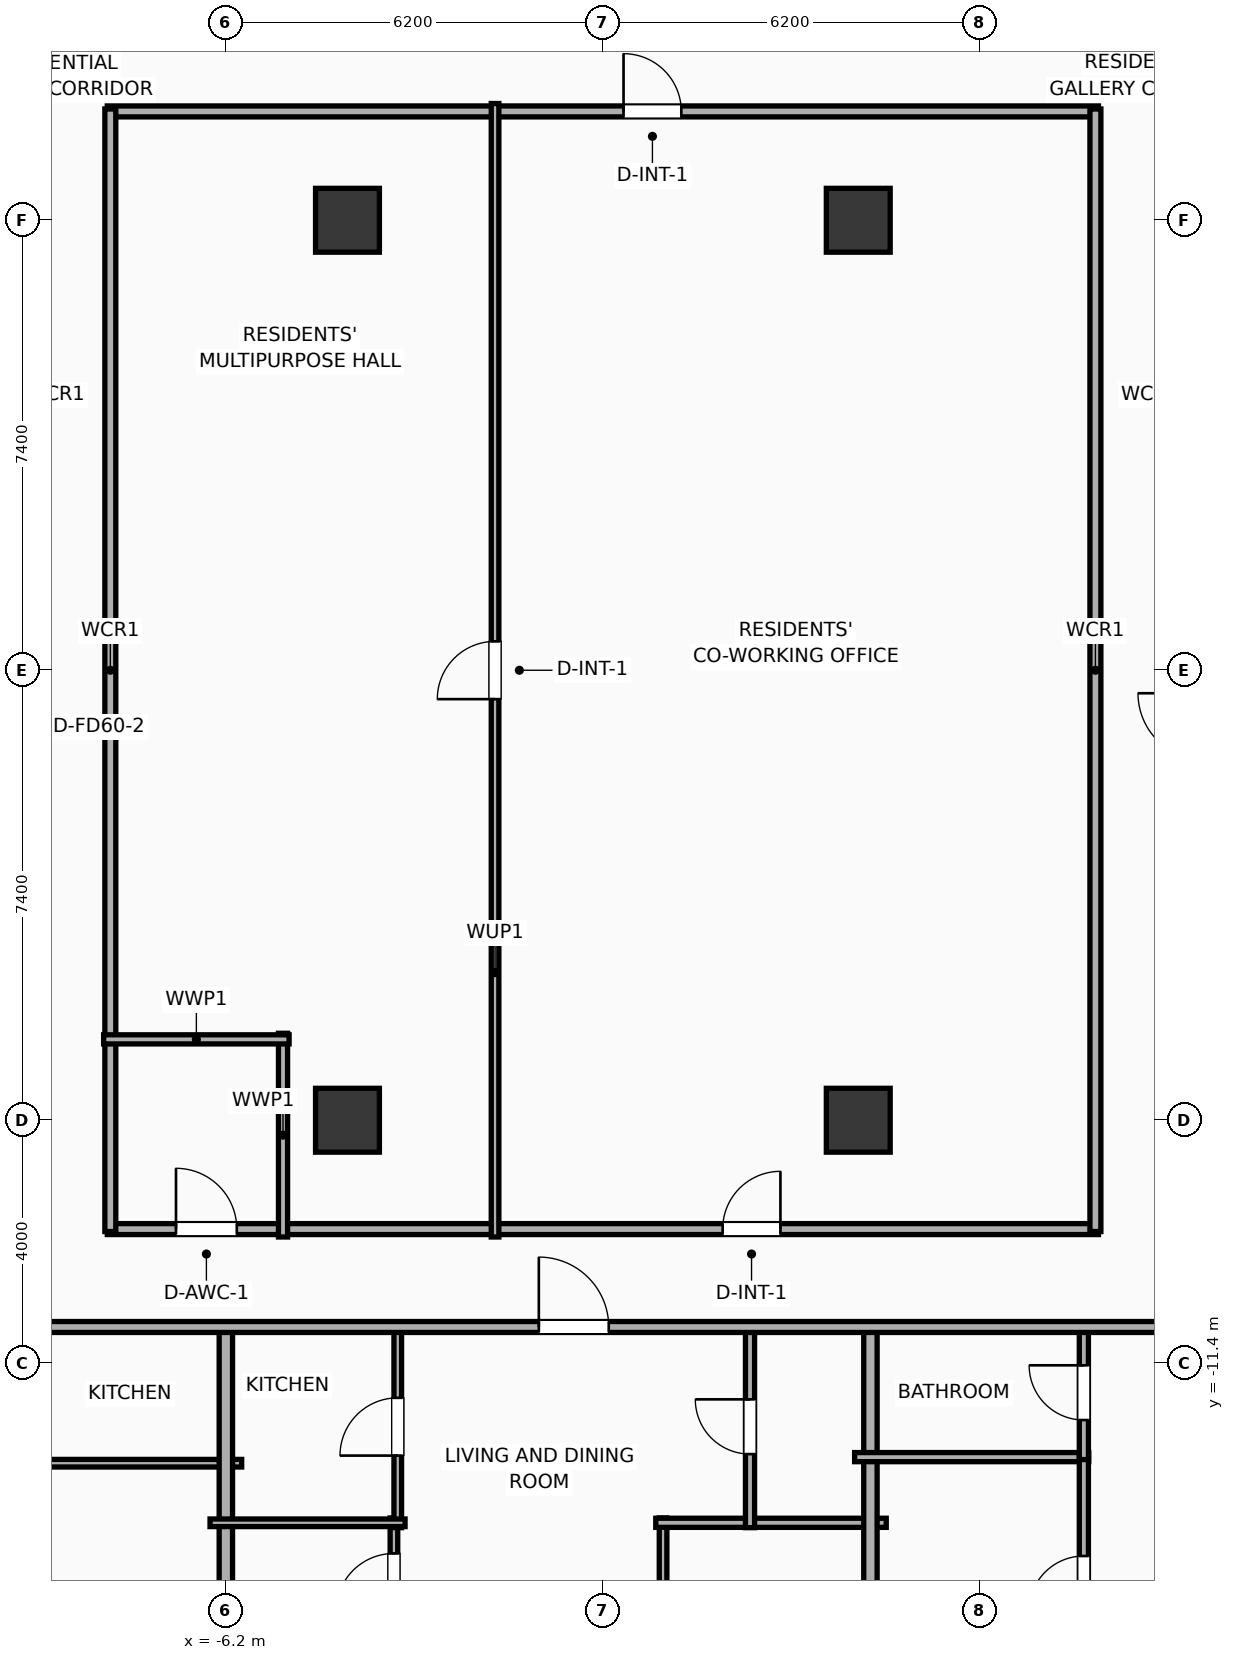
"""IFC4 building model, lengths in metres.
Left out: names, types, materials, properties, quantities, classifications, styles, units other than length and angle.
Written with IfcOpenShell. Run it as: python <this file> out.ifc"""

import sys

from ifc_helpers import new_model, si_unit, direction, frame, frame_2d, origin, origin_2d, place, context, subcontext, project, spatial, rectangle, extrude, element, fill, save


model = new_model("IFC4")
c1 = context("Model", 3, precision=1e-05, world=origin(), true_north=direction((0.0, 1.0)))
c2 = subcontext(c1, "Body", "Model", "MODEL_VIEW")
j1 = project(units=[si_unit("LENGTHUNIT", "METRE"), si_unit("PLANEANGLEUNIT", "RADIAN")], contexts=[c1])
p1 = place(None, origin())
s1 = spatial("IfcSite", under=j1, at=p1, CompositionType="ELEMENT")
p2 = place(p1, origin())
s2 = spatial("IfcBuilding", under=s1, at=p2, CompositionType="ELEMENT")
p3 = place(p2, frame((0.0, 0.0, 132.6)))
s3 = spatial("IfcBuildingStorey", under=s2, at=p3, CompositionType="ELEMENT", Elevation=132.6)
for number, where, z_axis, x_axis in (
    (1, (-4.2, -7.4, 0.0), (0.0, 0.0, 1.0), (1.0, 0.0, 0.0)),
    (2, (-4.2, 7.4, 0.0), (0.0, 0.0, 1.0), (1.0, 0.0, 0.0)),
    (3, (4.2, -7.4, 0.0), (0.0, 0.0, 1.0), (1.0, 0.0, 0.0)),
    (4, (4.2, 7.4, 0.0), (0.0, 0.0, 1.0), (1.0, 0.0, 0.0)),
):
    element("IfcColumn", number, at=place(p3, frame(where, z_axis=z_axis, x_axis=x_axis)), inside=s3, PredefinedType="COLUMN", context=c2, shape_type="SweptSolid", body=[
        extrude(rectangle(XDim=1.05, YDim=1.05, at=origin_2d()), origin(), (0.0, 0.0, 1.0), 3.9),
    ])
p4 = place(p3, frame((-8.15, 9.19, 0.0), z_axis=(0.0, 0.0, 1.0), x_axis=(1.0, 0.0, 0.0)))
e5 = element("IfcWall", 5, at=p4, inside=s3, PredefinedType="PARTITIONING", context=c2, shape_type="SweptSolid", body=[
    extrude(rectangle(XDim=16.3, YDim=0.18, at=frame_2d((8.15, 0.0))), origin(), (0.0, 0.0, 1.0), 3.65),
])
p5 = place(p4, frame((8.49, 0.0, 0.0)))
e6 = element("IfcOpeningElement", 6, at=p5, cuts=e5, PredefinedType="OPENING", context=c2, shape_type="SweptSolid", body=[
    extrude(rectangle(XDim=0.95, YDim=2.05, at=frame_2d((0.475, 1.025))), frame((0.0, 0.1, 0.0), z_axis=(0.0, -1.0, 0.0), x_axis=(1.0, 0.0, 0.0)), (0.0, 0.0, 1.0), 0.2),
])
p6 = place(p3, frame((-8.15, -9.19, 0.0), z_axis=(0.0, 0.0, 1.0), x_axis=(1.0, 0.0, 0.0)))
e7 = element("IfcWall", 7, at=p6, inside=s3, PredefinedType="PARTITIONING", context=c2, shape_type="SweptSolid", body=[
    extrude(rectangle(XDim=16.3, YDim=0.18, at=frame_2d((8.15, 0.0))), origin(), (0.0, 0.0, 1.0), 3.65),
])
p7 = place(p6, frame((1.13, 0.0, 0.0)))
e8 = element("IfcOpeningElement", 8, at=p7, cuts=e7, PredefinedType="OPENING", context=c2, shape_type="SweptSolid", body=[
    extrude(rectangle(XDim=1.0, YDim=2.05, at=frame_2d((0.5, 1.025))), frame((0.0, 0.1, 0.0), z_axis=(0.0, -1.0, 0.0), x_axis=(1.0, 0.0, 0.0)), (0.0, 0.0, 1.0), 0.2),
])
p8 = place(p6, frame((10.12, 0.0, 0.0)))
e9 = element("IfcOpeningElement", 9, at=p8, cuts=e7, PredefinedType="OPENING", context=c2, shape_type="SweptSolid", body=[
    extrude(rectangle(XDim=0.95, YDim=2.05, at=frame_2d((0.475, 1.025))), frame((0.0, 0.1, 0.0), z_axis=(0.0, -1.0, 0.0), x_axis=(1.0, 0.0, 0.0)), (0.0, 0.0, 1.0), 0.2),
])
for number, where, z_axis, x_axis in (
    (10, (-8.1, -9.23, 0.0), (0.0, 0.0, 1.0), (0.0, 1.0, 0.0)),
    (11, (8.1, -9.23, 0.0), (0.0, 0.0, 1.0), (0.0, 1.0, 0.0)),
):
    element("IfcWall", number, at=place(p3, frame(where, z_axis=z_axis, x_axis=x_axis)), inside=s3, PredefinedType="PARTITIONING", context=c2, shape_type="SweptSolid", body=[
        extrude(rectangle(XDim=18.46, YDim=0.18, at=frame_2d((9.23, 0.0))), origin(), (0.0, 0.0, 1.0), 3.65),
    ])
p9 = place(p3, frame((-5.26, -9.32, 0.0), z_axis=(0.0, 0.0, 1.0), x_axis=(0.0, 1.0, 0.0)))
e12 = element("IfcWall", 12, at=p9, inside=s3, PredefinedType="PLUMBINGWALL", context=c2, shape_type="SweptSolid", body=[
    extrude(rectangle(XDim=3.35, YDim=0.15, at=frame_2d((1.675, 0.0))), origin(), (0.0, 0.0, 1.0), 3.65),
])
p10 = place(p3, frame((-8.21, -6.07, 0.0), z_axis=(0.0, 0.0, 1.0), x_axis=(1.0, 0.0, 0.0)))
e13 = element("IfcWall", 13, at=p10, inside=s3, PredefinedType="PLUMBINGWALL", context=c2, shape_type="SweptSolid", body=[
    extrude(rectangle(XDim=3.05, YDim=0.15, at=frame_2d((1.525, 0.0))), origin(), (0.0, 0.0, 1.0), 3.65),
])
p11 = place(p3, frame((-1.773, -9.32, 0.0), z_axis=(0.0, 0.0, 1.0), x_axis=(0.0, 1.0, 0.0)))
e14 = element("IfcWall", 14, at=p11, inside=s3, PredefinedType="PARTITIONING", context=c2, shape_type="SweptSolid", body=[
    extrude(rectangle(XDim=18.64, YDim=0.125, at=frame_2d((9.32, 0.0))), origin(), (0.0, 0.0, 1.0), 3.65),
])
p12 = place(p11, frame((8.845, 0.0, 0.0)))
e15 = element("IfcOpeningElement", 15, at=p12, cuts=e14, PredefinedType="OPENING", context=c2, shape_type="SweptSolid", body=[
    extrude(rectangle(XDim=0.95, YDim=2.05, at=frame_2d((0.475, 1.025))), frame((0.0, 0.073, 0.0), z_axis=(0.0, -1.0, 0.0), x_axis=(1.0, 0.0, 0.0)), (0.0, 0.0, 1.0), 0.145),
])
p13 = place(p3, frame((-9.44, -13.04, 0.0), z_axis=(0.0, 0.0, 1.0), x_axis=(1.0, 0.0, 0.0)))
e16 = element("IfcWall", 16, at=p13, inside=s3, PredefinedType="PARTITIONING", context=c2, shape_type="SweptSolid", body=[
    extrude(rectangle(XDim=3.5, YDim=0.125, at=frame_2d((1.75, 0.0))), origin(), (0.0, 0.0, 1.0), 3.65),
])
p14 = place(p3, frame((-6.2, -20.41, 0.0), z_axis=(0.0, 0.0, 1.0), x_axis=(0.0, 1.0, 0.0)))
e17 = element("IfcWall", 17, at=p14, inside=s3, PredefinedType="PARTITIONING", context=c2, shape_type="SweptSolid", body=[
    extrude(rectangle(XDim=9.69, YDim=0.22, at=frame_2d((4.845, 0.0))), origin(), (0.0, 0.0, 1.0), 3.65),
])
p15 = place(p3, frame((-3.436, -20.56, 0.0), z_axis=(0.0, 0.0, 1.0), x_axis=(0.0, 1.0, 0.0)))
e18 = element("IfcWall", 18, at=p15, inside=s3, PredefinedType="PARTITIONING", context=c2, shape_type="SweptSolid", body=[
    extrude(rectangle(XDim=6.62, YDim=0.125, at=frame_2d((3.31, 0.0))), origin(), (0.0, 0.0, 1.0), 3.04),
])
p16 = place(p15, frame((5.086, 0.0, 0.0)))
e19 = element("IfcOpeningElement", 19, at=p16, cuts=e18, PredefinedType="OPENING", context=c2, shape_type="SweptSolid", body=[
    extrude(rectangle(XDim=0.95, YDim=2.05, at=frame_2d((0.475, 1.025))), frame((0.0, 0.073, 0.0), z_axis=(0.0, -1.0, 0.0), x_axis=(1.0, 0.0, 0.0)), (0.0, 0.0, 1.0), 0.145),
])
p17 = place(p3, frame((0.99, -20.56, 0.0), z_axis=(0.0, 0.0, 1.0), x_axis=(0.0, 1.0, 0.0)))
e20 = element("IfcWall", 20, at=p17, inside=s3, PredefinedType="PARTITIONING", context=c2, shape_type="SweptSolid", body=[
    extrude(rectangle(XDim=6.62, YDim=0.125, at=frame_2d((3.31, 0.0))), origin(), (0.0, 0.0, 1.0), 3.65),
])
p18 = place(p17, frame((4.581, 0.0, 0.0)))
e21 = element("IfcOpeningElement", 21, at=p18, cuts=e20, PredefinedType="OPENING", context=c2, shape_type="SweptSolid", body=[
    extrude(rectangle(XDim=0.9, YDim=2.05, at=frame_2d((0.45, 1.025))), frame((0.0, 0.073, 0.0), z_axis=(0.0, -1.0, 0.0), x_axis=(1.0, 0.0, 0.0)), (0.0, 0.0, 1.0), 0.145),
])
p19 = place(p3, frame((0.87, -14.02, 0.0), z_axis=(0.0, 0.0, 1.0), x_axis=(1.0, 0.0, 0.0)))
e22 = element("IfcWall", 22, at=p19, inside=s3, PredefinedType="PLUMBINGWALL", context=c2, shape_type="SweptSolid", body=[
    extrude(rectangle(XDim=3.79, YDim=0.15, at=frame_2d((1.895, 0.0))), origin(), (0.0, 0.0, 1.0), 3.65),
])
p20 = place(p3, frame((-3.373, -14.1, 0.0), z_axis=(0.0, 0.0, 1.0), x_axis=(0.0, 1.0, 0.0)))
e23 = element("IfcWall", 23, at=p20, inside=s3, PredefinedType="PARTITIONING", context=c2, shape_type="SweptSolid", body=[
    extrude(rectangle(XDim=3.32, YDim=0.125, at=frame_2d((1.66, 0.0))), origin(), (0.0, 0.0, 1.0), 3.65),
])
p21 = place(p20, frame((1.185, 0.0, 0.0)))
e24 = element("IfcOpeningElement", 24, at=p21, cuts=e23, PredefinedType="OPENING", context=c2, shape_type="SweptSolid", body=[
    extrude(rectangle(XDim=0.95, YDim=2.05, at=frame_2d((0.475, 1.025))), frame((0.0, 0.073, 0.0), z_axis=(0.0, -1.0, 0.0), x_axis=(1.0, 0.0, 0.0)), (0.0, 0.0, 1.0), 0.145),
])
p22 = place(p3, frame((-6.46, -14.02, 0.0), z_axis=(0.0, 0.0, 1.0), x_axis=(1.0, 0.0, 0.0)))
e25 = element("IfcWall", 25, at=p22, inside=s3, PredefinedType="PARTITIONING", context=c2, shape_type="SweptSolid", body=[
    extrude(rectangle(XDim=3.207, YDim=0.125, at=frame_2d((1.604, 0.0))), origin(), (0.0, 0.0, 1.0), 3.65),
])
p23 = place(p3, frame((2.42, -14.1, 0.0), z_axis=(0.0, 0.0, 1.0), x_axis=(0.0, 1.0, 0.0)))
e26 = element("IfcWall", 26, at=p23, inside=s3, PredefinedType="PLUMBINGWALL", context=c2, shape_type="SweptSolid", body=[
    extrude(rectangle(XDim=3.32, YDim=0.15, at=frame_2d((1.66, 0.0))), origin(), (0.0, 0.0, 1.0), 3.65),
])
p24 = place(p23, frame((1.21, 0.0, 0.0)))
e27 = element("IfcOpeningElement", 27, at=p24, cuts=e26, PredefinedType="OPENING", context=c2, shape_type="SweptSolid", body=[
    extrude(rectangle(XDim=0.9, YDim=2.05, at=frame_2d((0.45, 1.025))), frame((0.0, 0.085, 0.0), z_axis=(0.0, -1.0, 0.0), x_axis=(1.0, 0.0, 0.0)), (0.0, 0.0, 1.0), 0.17),
])
p25 = place(p3, frame((4.4, -20.41, 0.0), z_axis=(0.0, 0.0, 1.0), x_axis=(0.0, 1.0, 0.0)))
e28 = element("IfcWall", 28, at=p25, inside=s3, PredefinedType="PARTITIONING", context=c2, shape_type="SweptSolid", body=[
    extrude(rectangle(XDim=9.69, YDim=0.22, at=frame_2d((4.845, 0.0))), origin(), (0.0, 0.0, 1.0), 3.65),
])
p26 = place(p3, frame((4.14, -12.94, 0.0), z_axis=(0.0, 0.0, 1.0), x_axis=(1.0, 0.0, 0.0)))
e29 = element("IfcWall", 29, at=p26, inside=s3, PredefinedType="PLUMBINGWALL", context=c2, shape_type="SweptSolid", body=[
    extrude(rectangle(XDim=3.85, YDim=0.15, at=frame_2d((1.925, 0.0))), origin(), (0.0, 0.0, 1.0), 3.65),
])
p27 = place(p3, frame((7.91, -20.458, 0.0), z_axis=(0.0, 0.0, 1.0), x_axis=(0.0, 1.0, 0.0)))
e30 = element("IfcWall", 30, at=p27, inside=s3, PredefinedType="PLUMBINGWALL", context=c2, shape_type="SweptSolid", body=[
    extrude(rectangle(XDim=7.558, YDim=0.15, at=frame_2d((3.779, 0.0))), origin(), (0.0, 0.0, 1.0), 3.65),
])
p28 = place(p27, frame((4.991, 0.0, 0.0)))
e31 = element("IfcOpeningElement", 31, at=p28, cuts=e30, PredefinedType="OPENING", context=c2, shape_type="SweptSolid", body=[
    extrude(rectangle(XDim=0.9, YDim=2.05, at=frame_2d((0.45, 1.025))), frame((0.0, 0.085, 0.0), z_axis=(0.0, -1.0, 0.0), x_axis=(1.0, 0.0, 0.0)), (0.0, 0.0, 1.0), 0.17),
])
p29 = place(p3, frame((7.91, -12.98, 0.0), z_axis=(0.0, 0.0, 1.0), x_axis=(0.0, 1.0, 0.0)))
e32 = element("IfcWall", 32, at=p29, inside=s3, PredefinedType="PLUMBINGWALL", context=c2, shape_type="SweptSolid", body=[
    extrude(rectangle(XDim=2.2, YDim=0.15, at=frame_2d((1.1, 0.0))), origin(), (0.0, 0.0, 1.0), 3.65),
])
p30 = place(p29, frame((0.65, 0.0, 0.0)))
e33 = element("IfcOpeningElement", 33, at=p30, cuts=e32, PredefinedType="OPENING", context=c2, shape_type="SweptSolid", body=[
    extrude(rectangle(XDim=0.9, YDim=2.05, at=frame_2d((0.45, 1.025))), frame((0.0, 0.085, 0.0), z_axis=(0.0, -1.0, 0.0), x_axis=(1.0, 0.0, 0.0)), (0.0, 0.0, 1.0), 0.17),
])
p31 = place(p3, frame((-29.21, -10.8, 0.0), z_axis=(0.0, 0.0, 1.0), x_axis=(1.0, 0.0, 0.0)))
e34 = element("IfcWall", 34, at=p31, inside=s3, PredefinedType="PARTITIONING", context=c2, shape_type="SweptSolid", body=[
    extrude(rectangle(XDim=62.42, YDim=0.18, at=frame_2d((31.21, 0.0))), origin(), (0.0, 0.0, 1.0), 3.65),
])
p32 = place(p31, frame((2.74, 0.0, 0.0)))
e35 = element("IfcOpeningElement", 35, at=p32, cuts=e34, PredefinedType="OPENING", context=c2, shape_type="SweptSolid", body=[
    extrude(rectangle(XDim=0.9, YDim=2.05, at=frame_2d((0.45, 1.025))), frame((0.0, 0.1, 0.0), z_axis=(0.0, -1.0, 0.0), x_axis=(1.0, 0.0, 0.0)), (0.0, 0.0, 1.0), 0.2),
])
p33 = place(p31, frame((9.968, 0.0, 0.0)))
e36 = element("IfcOpeningElement", 36, at=p33, cuts=e34, PredefinedType="OPENING", context=c2, shape_type="SweptSolid", body=[
    extrude(rectangle(XDim=1.15, YDim=2.05, at=frame_2d((0.575, 1.025))), frame((0.0, 0.1, 0.0), z_axis=(0.0, -1.0, 0.0), x_axis=(1.0, 0.0, 0.0)), (0.0, 0.0, 1.0), 0.2),
])
p34 = place(p31, frame((17.227, 0.0, 0.0)))
e37 = element("IfcOpeningElement", 37, at=p34, cuts=e34, PredefinedType="OPENING", context=c2, shape_type="SweptSolid", body=[
    extrude(rectangle(XDim=1.15, YDim=2.05, at=frame_2d((0.575, 1.025))), frame((0.0, 0.1, 0.0), z_axis=(0.0, -1.0, 0.0), x_axis=(1.0, 0.0, 0.0)), (0.0, 0.0, 1.0), 0.2),
])
p35 = place(p31, frame((28.157, 0.0, 0.0)))
e38 = element("IfcOpeningElement", 38, at=p35, cuts=e34, PredefinedType="OPENING", context=c2, shape_type="SweptSolid", body=[
    extrude(rectangle(XDim=1.15, YDim=2.05, at=frame_2d((0.575, 1.025))), frame((0.0, 0.1, 0.0), z_axis=(0.0, -1.0, 0.0), x_axis=(1.0, 0.0, 0.0)), (0.0, 0.0, 1.0), 0.2),
])
p36 = place(p31, frame((38.512, 0.0, 0.0)))
e39 = element("IfcOpeningElement", 39, at=p36, cuts=e34, PredefinedType="OPENING", context=c2, shape_type="SweptSolid", body=[
    extrude(rectangle(XDim=1.15, YDim=2.05, at=frame_2d((0.575, 1.025))), frame((0.0, 0.1, 0.0), z_axis=(0.0, -1.0, 0.0), x_axis=(1.0, 0.0, 0.0)), (0.0, 0.0, 1.0), 0.2),
])
p37 = place(p31, frame((49.33, 0.0, 0.0)))
e40 = element("IfcOpeningElement", 40, at=p37, cuts=e34, PredefinedType="OPENING", context=c2, shape_type="SweptSolid", body=[
    extrude(rectangle(XDim=1.15, YDim=2.05, at=frame_2d((0.575, 1.025))), frame((0.0, 0.1, 0.0), z_axis=(0.0, -1.0, 0.0), x_axis=(1.0, 0.0, 0.0)), (0.0, 0.0, 1.0), 0.2),
])
p38 = place(p31, frame((58.237, 0.0, 0.0)))
e41 = element("IfcOpeningElement", 41, at=p38, cuts=e34, PredefinedType="OPENING", context=c2, shape_type="SweptSolid", body=[
    extrude(rectangle(XDim=1.15, YDim=2.05, at=frame_2d((0.575, 1.025))), frame((0.0, 0.1, 0.0), z_axis=(0.0, -1.0, 0.0), x_axis=(1.0, 0.0, 0.0)), (0.0, 0.0, 1.0), 0.2),
])
p39 = place(p5, origin())
e42 = element("IfcDoor", 42, at=p39, inside=s3, OperationType="SINGLE_SWING_LEFT", PredefinedType="DOOR", context=c2, shape_type="SweptSolid", body=[
    extrude(rectangle(XDim=0.95, YDim=2.05, at=frame_2d((0.475, 1.025))), frame((0.0, 0.025, 0.0), z_axis=(0.0, -1.0, 0.0), x_axis=(1.0, 0.0, 0.0)), (0.0, 0.0, 1.0), 0.05),
])
fill(e6, e42)
p40 = place(p7, origin())
e43 = element("IfcDoor", 43, at=p40, inside=s3, OperationType="SINGLE_SWING_LEFT", PredefinedType="DOOR", context=c2, shape_type="SweptSolid", body=[
    extrude(rectangle(XDim=1.0, YDim=2.05, at=frame_2d((0.5, 1.025))), frame((0.0, 0.025, 0.0), z_axis=(0.0, -1.0, 0.0), x_axis=(1.0, 0.0, 0.0)), (0.0, 0.0, 1.0), 0.05),
])
fill(e8, e43)
p41 = place(p8, origin())
e44 = element("IfcDoor", 44, at=p41, inside=s3, OperationType="SINGLE_SWING_RIGHT", PredefinedType="DOOR", context=c2, shape_type="SweptSolid", body=[
    extrude(rectangle(XDim=0.95, YDim=2.05, at=frame_2d((0.475, 1.025))), frame((0.0, 0.025, 0.0), z_axis=(0.0, -1.0, 0.0), x_axis=(1.0, 0.0, 0.0)), (0.0, 0.0, 1.0), 0.05),
])
fill(e9, e44)
p42 = place(p12, origin())
e45 = element("IfcDoor", 45, at=p42, inside=s3, OperationType="SINGLE_SWING_LEFT", PredefinedType="DOOR", context=c2, shape_type="SweptSolid", body=[
    extrude(rectangle(XDim=0.95, YDim=2.05, at=frame_2d((0.475, 1.025))), frame((0.0, 0.025, 0.0), z_axis=(0.0, -1.0, 0.0), x_axis=(1.0, 0.0, 0.0)), (0.0, 0.0, 1.0), 0.05),
])
fill(e15, e45)
p43 = place(p16, origin())
e46 = element("IfcDoor", 46, at=p43, inside=s3, OperationType="SINGLE_SWING_LEFT", PredefinedType="DOOR", context=c2, shape_type="SweptSolid", body=[
    extrude(rectangle(XDim=0.95, YDim=2.05, at=frame_2d((0.475, 1.025))), frame((0.0, 0.025, 0.0), z_axis=(0.0, -1.0, 0.0), x_axis=(1.0, 0.0, 0.0)), (0.0, 0.0, 1.0), 0.05),
])
fill(e19, e46)
p44 = place(p21, origin())
e47 = element("IfcDoor", 47, at=p44, inside=s3, OperationType="SINGLE_SWING_LEFT", PredefinedType="DOOR", context=c2, shape_type="SweptSolid", body=[
    extrude(rectangle(XDim=0.95, YDim=2.05, at=frame_2d((0.475, 1.025))), frame((0.0, 0.025, 0.0), z_axis=(0.0, -1.0, 0.0), x_axis=(1.0, 0.0, 0.0)), (0.0, 0.0, 1.0), 0.05),
])
fill(e24, e47)
p45 = place(p24, origin())
e48 = element("IfcDoor", 48, at=p45, inside=s3, OperationType="SINGLE_SWING_RIGHT", PredefinedType="DOOR", context=c2, shape_type="SweptSolid", body=[
    extrude(rectangle(XDim=0.9, YDim=2.05, at=frame_2d((0.45, 1.025))), frame((0.0, 0.025, 0.0), z_axis=(0.0, -1.0, 0.0), x_axis=(1.0, 0.0, 0.0)), (0.0, 0.0, 1.0), 0.05),
])
fill(e27, e48)
p46 = place(p28, origin())
e49 = element("IfcDoor", 49, at=p46, inside=s3, OperationType="SINGLE_SWING_LEFT", PredefinedType="DOOR", context=c2, shape_type="SweptSolid", body=[
    extrude(rectangle(XDim=0.9, YDim=2.05, at=frame_2d((0.45, 1.025))), frame((0.0, 0.025, 0.0), z_axis=(0.0, -1.0, 0.0), x_axis=(1.0, 0.0, 0.0)), (0.0, 0.0, 1.0), 0.05),
])
fill(e31, e49)
p47 = place(p30, origin())
e50 = element("IfcDoor", 50, at=p47, inside=s3, OperationType="SINGLE_SWING_RIGHT", PredefinedType="DOOR", context=c2, shape_type="SweptSolid", body=[
    extrude(rectangle(XDim=0.9, YDim=2.05, at=frame_2d((0.45, 1.025))), frame((0.0, 0.025, 0.0), z_axis=(0.0, -1.0, 0.0), x_axis=(1.0, 0.0, 0.0)), (0.0, 0.0, 1.0), 0.05),
])
fill(e33, e50)
p48 = place(p35, origin())
e51 = element("IfcDoor", 51, at=p48, inside=s3, OperationType="SINGLE_SWING_LEFT", PredefinedType="DOOR", context=c2, shape_type="SweptSolid", body=[
    extrude(rectangle(XDim=1.15, YDim=2.05, at=frame_2d((0.575, 1.025))), frame((0.0, 0.025, 0.0), z_axis=(0.0, -1.0, 0.0), x_axis=(1.0, 0.0, 0.0)), (0.0, 0.0, 1.0), 0.05),
])
fill(e38, e51)
save(model, sys.argv[1])
